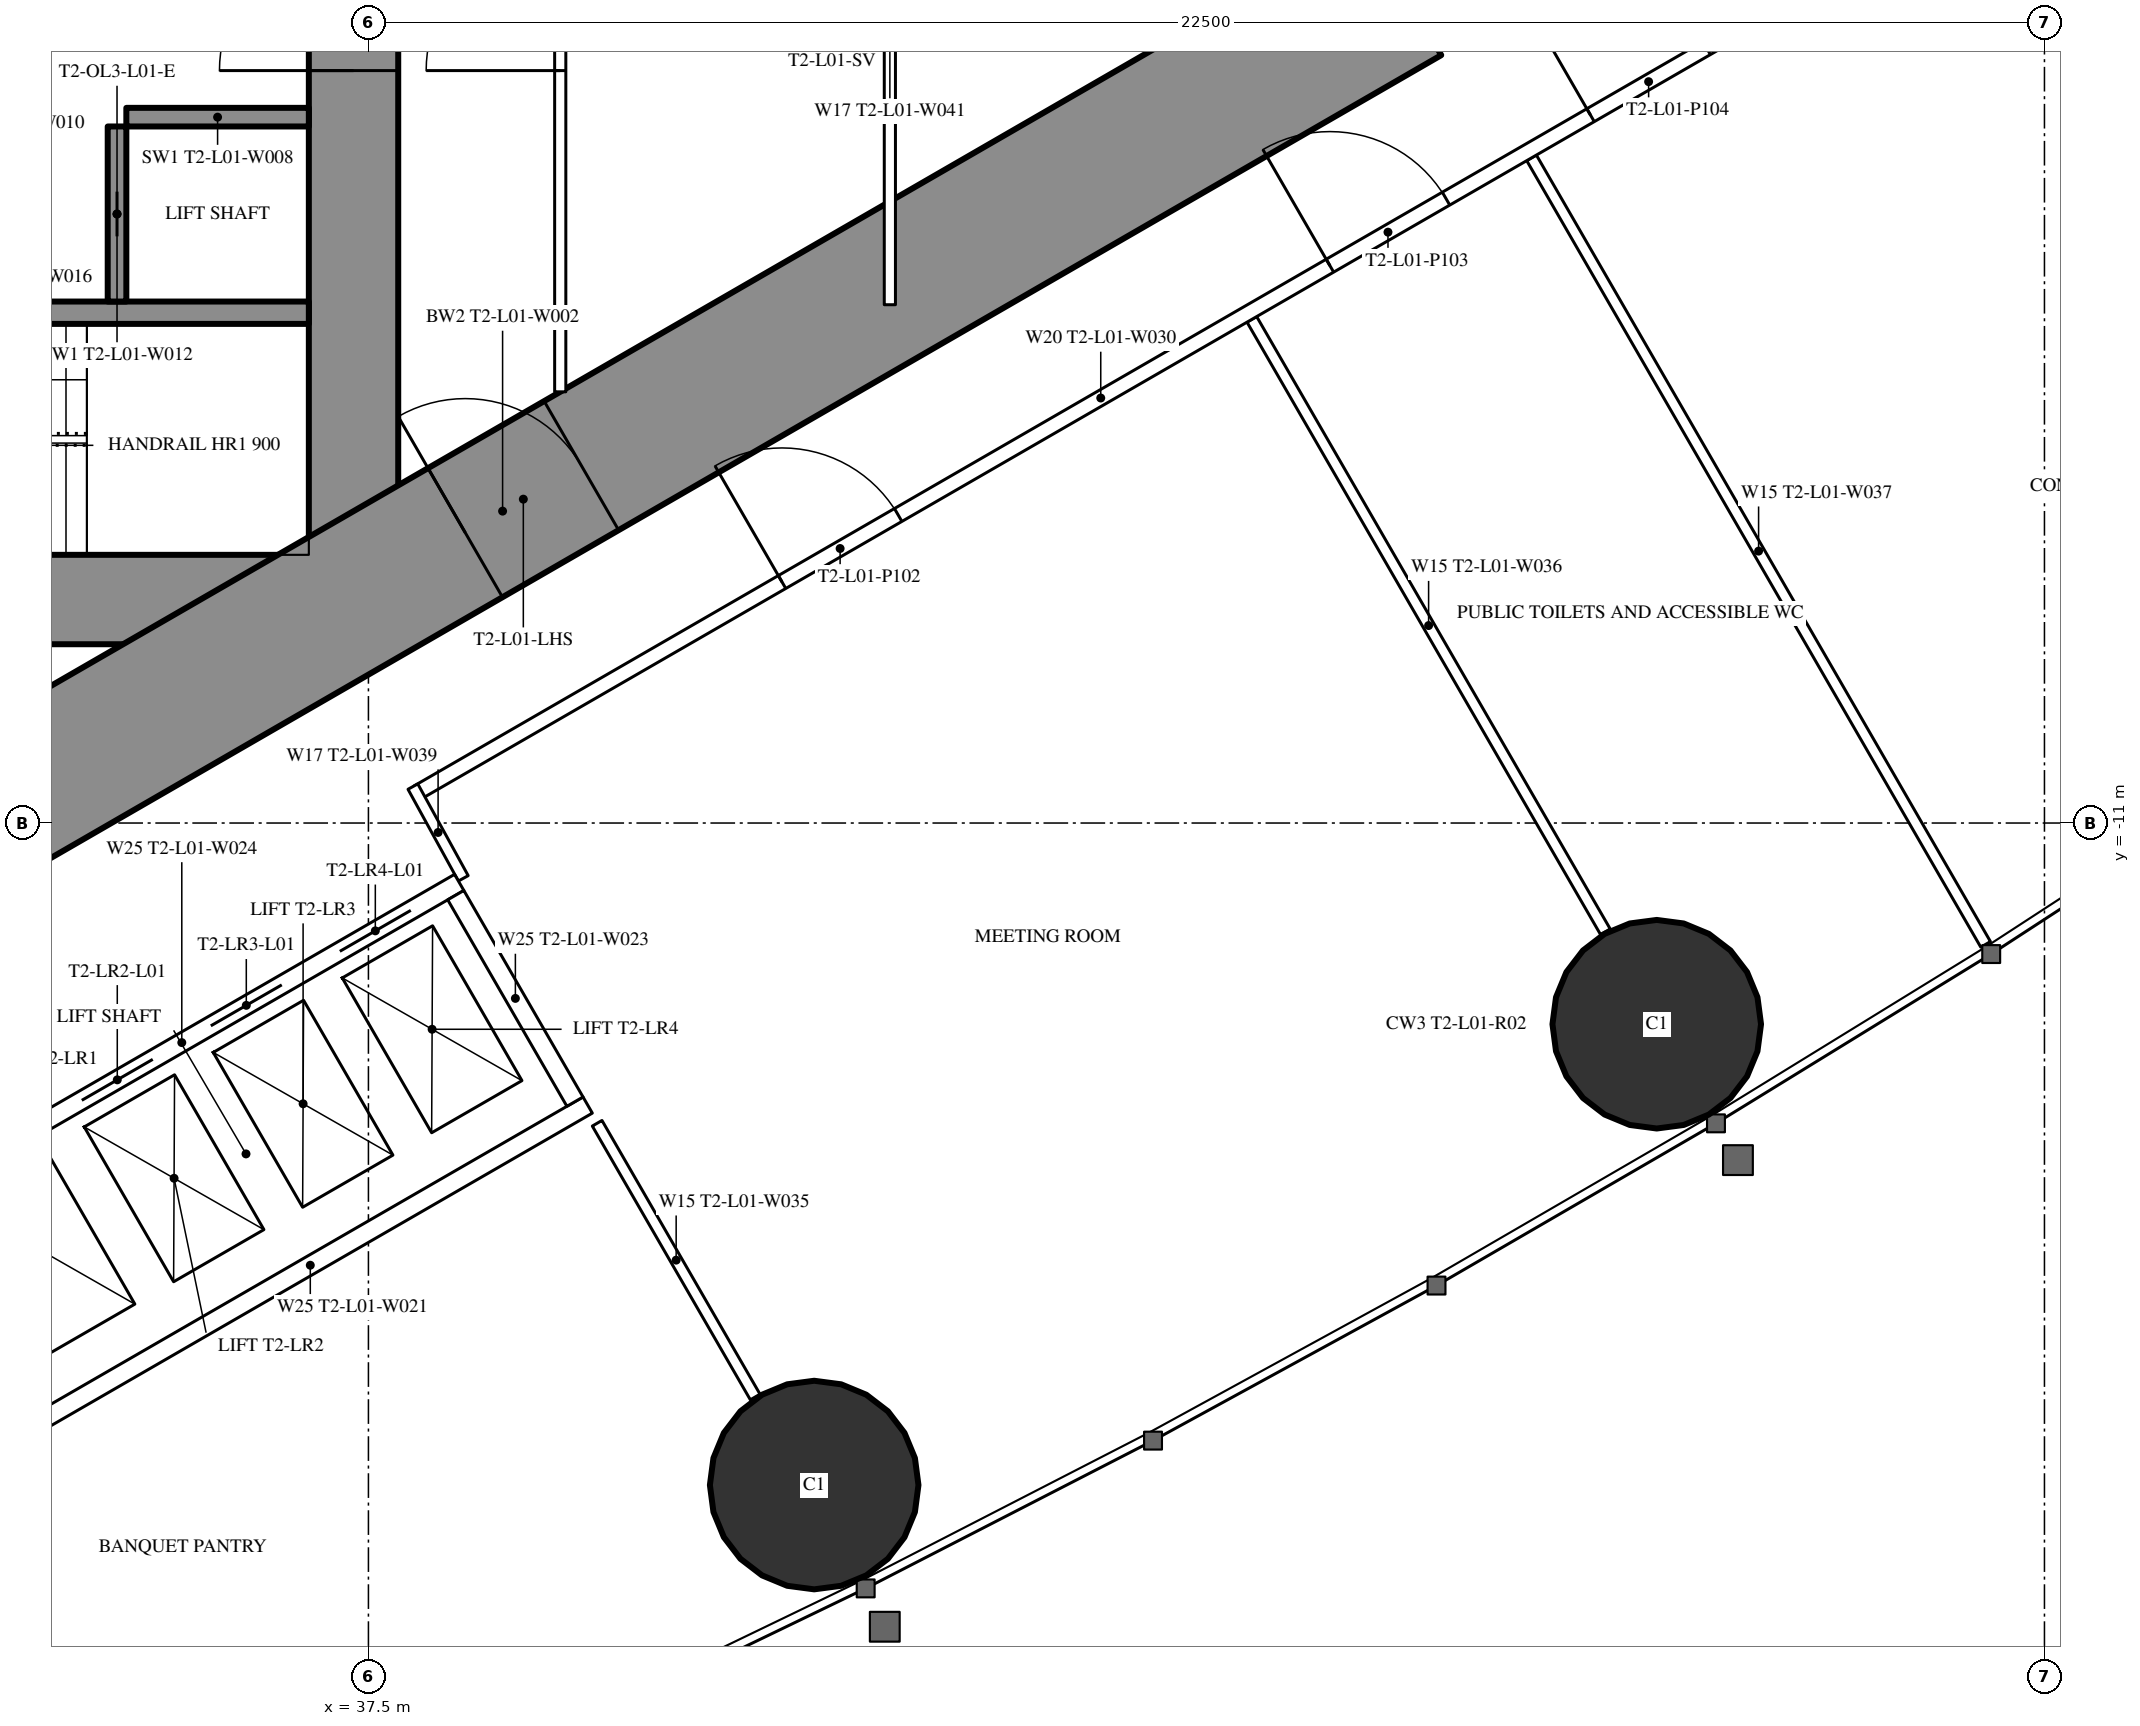
"""IFC4 building model, lengths in metres.
Left out: names, types, materials, properties, quantities, classifications, styles, units other than length and angle.
Written with IfcOpenShell. Run it as: python <this file> out.ifc"""

import sys

from ifc_helpers import new_model, si_unit, direction, frame, frame_2d, origin, origin_2d, place, context, subcontext, project, spatial, rectangle, hollow_circle, extrude, element, fill, save


model = new_model("IFC4")
c1 = context("Model", 3, precision=1e-05, world=origin(), true_north=direction((0.0, 1.0)))
c2 = subcontext(c1, "Body", "Model", "MODEL_VIEW")
j1 = project(units=[si_unit("LENGTHUNIT", "METRE"), si_unit("PLANEANGLEUNIT", "RADIAN")], contexts=[c1])
p1 = place(None, origin())
s1 = spatial("IfcSite", under=j1, at=p1, CompositionType="ELEMENT")
p2 = place(p1, origin())
s2 = spatial("IfcBuilding", under=s1, at=p2, CompositionType="ELEMENT")
p3 = place(p2, frame((0.0, 0.0, 7.2)))
s3 = spatial("IfcBuildingStorey", under=s2, at=p3, CompositionType="ELEMENT", Elevation=7.2)
for number, where, z_axis, x_axis in (
    (1, (43.484, -19.886, 0.0), (0.0, 0.0, 1.0), (1.0, 0.0, 0.0)),
    (2, (54.795, -13.701, 0.0), (0.0, 0.0, 1.0), (1.0, 0.0, 0.0)),
):
    element("IfcColumn", number, at=place(p3, frame(where, z_axis=z_axis, x_axis=x_axis)), inside=s3, PredefinedType="COLUMN", context=c2, shape_type="SweptSolid", body=[
        extrude(hollow_circle(Radius=1.4, WallThickness=0.12, at=origin_2d()), origin(), (0.0, 0.0, 1.0), 5.4),
    ])
p4 = place(p3, frame((61.5, 0.0, 0.0), z_axis=(0.0, 0.0, 1.0), x_axis=(1.0, 0.0, 0.0)))
e3 = element("IfcColumn", 3, at=p4, inside=s3, PredefinedType="COLUMN", context=c2, shape_type="SweptSolid", body=[
    extrude(hollow_circle(Radius=1.4, WallThickness=0.1, at=origin_2d()), origin(), (0.0, 0.0, 1.0), 5.4),
])
p5 = place(p3, frame((37.3, -8.6, 0.0), z_axis=(0.0, 0.0, 1.0), x_axis=(0.0, 1.0, 0.0)))
e4 = element("IfcWall", 4, at=p5, inside=s3, PredefinedType="SHEAR", context=c2, shape_type="SweptSolid", body=[
    extrude(rectangle(XDim=17.2, YDim=1.2, at=frame_2d((8.6, 0.0))), origin(), (0.0, 0.0, 1.0), 5.4),
])
p6 = place(p5, frame((7.7, 0.0, 0.0)))
e5 = element("IfcOpeningElement", 5, at=p6, cuts=e4, PredefinedType="OPENING", context=c2, shape_type="SweptSolid", body=[
    extrude(rectangle(XDim=1.8, YDim=2.2, at=frame_2d((0.9, 1.1))), frame((0.0, 0.61, 0.0), z_axis=(0.0, -1.0, 0.0), x_axis=(1.0, 0.0, 0.0)), (0.0, 0.0, 1.0), 1.22),
])
p7 = place(p3, frame((28.3, -8.0, 0.0), z_axis=(0.0, 0.0, 1.0), x_axis=(1.0, 0.0, 0.0)))
e6 = element("IfcWall", 6, at=p7, inside=s3, PredefinedType="SHEAR", context=c2, shape_type="SweptSolid", body=[
    extrude(rectangle(XDim=8.4, YDim=1.2, at=frame_2d((4.2, 0.0))), origin(), (0.0, 0.0, 1.0), 5.4),
])
p8 = place(p7, frame((0.25, 0.0, 0.0)))
e7 = element("IfcOpeningElement", 7, at=p8, cuts=e6, PredefinedType="OPENING", context=c2, shape_type="SweptSolid", body=[
    extrude(rectangle(XDim=1.0, YDim=2.2, at=frame_2d((0.5, 1.1))), frame((0.0, 0.61, 0.0), z_axis=(0.0, -1.0, 0.0), x_axis=(1.0, 0.0, 0.0)), (0.0, 0.0, 1.0), 1.22),
])
p9 = place(p3, frame((28.3, -4.15, 0.0), z_axis=(0.0, 0.0, 1.0), x_axis=(1.0, 0.0, 0.0)))
e8 = element("IfcWall", 8, at=p9, inside=s3, PredefinedType="SHEAR", context=c2, shape_type="SweptSolid", body=[
    extrude(rectangle(XDim=8.4, YDim=0.3, at=frame_2d((4.2, 0.0))), origin(), (0.0, 0.0, 1.0), 5.4),
])
p10 = place(p3, frame((34.125, -4.0, 0.0), z_axis=(0.0, 0.0, 1.0), x_axis=(0.0, 1.0, 0.0)))
e9 = element("IfcWall", 9, at=p10, inside=s3, PredefinedType="SHEAR", context=c2, shape_type="SweptSolid", body=[
    extrude(rectangle(XDim=2.35, YDim=0.25, at=frame_2d((1.175, 0.0))), origin(), (0.0, 0.0, 1.0), 5.4),
])
p11 = place(p10, frame((0.875, 0.0, 0.0)))
e10 = element("IfcOpeningElement", 10, at=p11, cuts=e9, PredefinedType="OPENING", context=c2, shape_type="SweptSolid", body=[
    extrude(rectangle(XDim=0.6, YDim=2.0, at=frame_2d((0.3, 1.0))), frame((0.0, 0.135, 0.0), z_axis=(0.0, -1.0, 0.0), x_axis=(1.0, 0.0, 0.0)), (0.0, 0.0, 1.0), 0.27),
])
p12 = place(p3, frame((34.25, -1.525, 0.0), z_axis=(0.0, 0.0, 1.0), x_axis=(1.0, 0.0, 0.0)))
e11 = element("IfcWall", 11, at=p12, inside=s3, PredefinedType="SHEAR", context=c2, shape_type="SweptSolid", body=[
    extrude(rectangle(XDim=2.45, YDim=0.25, at=frame_2d((1.225, 0.0))), origin(), (0.0, 0.0, 1.0), 5.4),
])
p13 = place(p3, frame((27.2, -13.8, 0.0), z_axis=(0.0, 0.0, 1.0), x_axis=(0.866027159892, 0.499996958321, 0.0)))
e12 = element("IfcWall", 12, at=p13, inside=s3, PredefinedType="SHEAR", context=c2, shape_type="SweptSolid", body=[
    extrude(rectangle(XDim=27.947, YDim=2.0, at=frame_2d((13.973, 0.0))), origin(), (0.0, 0.0, 1.0), 5.4),
])
p14 = place(p13, frame((4.6, 0.0, 0.0)))
e13 = element("IfcOpeningElement", 13, at=p14, cuts=e12, PredefinedType="OPENING", context=c2, shape_type="SweptSolid", body=[
    extrude(rectangle(XDim=1.0, YDim=2.2, at=frame_2d((0.5, 1.1))), frame((0.0, 1.01, 0.0), z_axis=(0.0, -1.0, 0.0), x_axis=(1.0, 0.0, 0.0)), (0.0, 0.0, 1.0), 2.02),
])
p15 = place(p13, frame((13.395, 0.0, 0.0)))
e14 = element("IfcOpeningElement", 14, at=p15, cuts=e12, PredefinedType="OPENING", context=c2, shape_type="SweptSolid", body=[
    extrude(rectangle(XDim=1.8, YDim=2.2, at=frame_2d((0.9, 1.1))), frame((0.0, 1.01, 0.0), z_axis=(0.0, -1.0, 0.0), x_axis=(1.0, 0.0, 0.0)), (0.0, 0.0, 1.0), 2.02),
])
p16 = place(p3, frame((49.36, -4.239, 0.0), z_axis=(0.0, 0.0, 1.0), x_axis=(0.499984446848, -0.866034383215, 0.0)))
e15 = element("IfcWall", 15, at=p16, inside=s3, PredefinedType="PARTITIONING", context=c2, shape_type="SweptSolid", body=[
    extrude(rectangle(XDim=9.491, YDim=0.15, at=frame_2d((4.746, 0.0))), origin(), (0.0, 0.0, 1.0), 4.05),
])
p17 = place(p3, frame((53.115, -2.071, 0.0), z_axis=(0.0, 0.0, 1.0), x_axis=(0.500000975677, -0.866024840476, 0.0)))
e16 = element("IfcWall", 16, at=p17, inside=s3, PredefinedType="PARTITIONING", context=c2, shape_type="SweptSolid", body=[
    extrude(rectangle(XDim=12.191, YDim=0.15, at=frame_2d((6.095, 0.0))), origin(), (0.0, 0.0, 1.0), 5.05),
])
p18 = place(p3, frame((40.57, -15.03, 0.0), z_axis=(0.0, 0.0, 1.0), x_axis=(0.500012993597, -0.866017901798, 0.0)))
e17 = element("IfcWall", 17, at=p18, inside=s3, PredefinedType="PARTITIONING", context=c2, shape_type="SweptSolid", body=[
    extrude(rectangle(XDim=4.243, YDim=0.15, at=frame_2d((2.122, 0.0))), origin(), (0.0, 0.0, 1.0), 5.05),
])
p19 = place(p3, frame((38.16, -10.59, 0.0), z_axis=(0.0, 0.0, 1.0), x_axis=(0.866027029586, 0.499997184019, 0.0)))
e18 = element("IfcWall", 18, at=p19, inside=s3, PredefinedType="PARTITIONING", context=c2, shape_type="SweptSolid", body=[
    extrude(rectangle(XDim=21.18, YDim=0.2, at=frame_2d((10.59, 0.0))), origin(), (0.0, 0.0, 1.0), 5.05),
])
p20 = place(p19, frame((14.142, 0.0, 0.0)))
e19 = element("IfcOpeningElement", 19, at=p20, cuts=e18, PredefinedType="OPENING", context=c2, shape_type="SweptSolid", body=[
    extrude(rectangle(XDim=1.8, YDim=2.2, at=frame_2d((0.9, 1.1))), frame((0.0, 0.11, 0.0), z_axis=(0.0, -1.0, 0.0), x_axis=(1.0, 0.0, 0.0)), (0.0, 0.0, 1.0), 0.22),
])
p21 = place(p19, frame((18.183, 0.0, 0.0)))
e20 = element("IfcOpeningElement", 20, at=p21, cuts=e18, PredefinedType="OPENING", context=c2, shape_type="SweptSolid", body=[
    extrude(rectangle(XDim=1.8, YDim=2.2, at=frame_2d((0.9, 1.1))), frame((0.0, 0.11, 0.0), z_axis=(0.0, -1.0, 0.0), x_axis=(1.0, 0.0, 0.0)), (0.0, 0.0, 1.0), 0.22),
])
p22 = place(p19, frame((5.65, 0.0, 0.0)))
e21 = element("IfcOpeningElement", 21, at=p22, cuts=e18, PredefinedType="OPENING", context=c2, shape_type="SweptSolid", body=[
    extrude(rectangle(XDim=1.8, YDim=2.2, at=frame_2d((0.9, 1.1))), frame((0.0, 0.11, 0.0), z_axis=(0.0, -1.0, 0.0), x_axis=(1.0, 0.0, 0.0)), (0.0, 0.0, 1.0), 0.22),
])
p23 = place(p3, frame((38.773, -11.742, 0.0), z_axis=(0.0, 0.0, 1.0), x_axis=(-0.481418475768, 0.876490873421, 0.0)))
e22 = element("IfcWall", 22, at=p23, inside=s3, PredefinedType="PARTITIONING", context=c2, shape_type="SweptSolid", body=[
    extrude(rectangle(XDim=1.405, YDim=0.15, at=frame_2d((0.703, 0.0))), origin(), (0.0, 0.0, 1.0), 5.05),
])
p24 = place(p3, frame((40.075, -5.212, 0.0), z_axis=(0.0, 0.0, 1.0), x_axis=(0.0, 1.0, 0.0)))
e23 = element("IfcWall", 23, at=p24, inside=s3, PredefinedType="PARTITIONING", context=c2, shape_type="SweptSolid", body=[
    extrude(rectangle(XDim=10.424, YDim=0.15, at=frame_2d((5.212, 0.0))), origin(), (0.0, 0.0, 1.0), 5.05),
])
p25 = place(p24, frame((4.312, 0.0, 0.0)))
e24 = element("IfcOpeningElement", 24, at=p25, cuts=e23, PredefinedType="OPENING", context=c2, shape_type="SweptSolid", body=[
    extrude(rectangle(XDim=1.8, YDim=2.2, at=frame_2d((0.9, 1.1))), frame((0.0, 0.085, 0.0), z_axis=(0.0, -1.0, 0.0), x_axis=(1.0, 0.0, 0.0)), (0.0, 0.0, 1.0), 0.17),
])
p26 = place(p3, frame((44.5, -4.043, 0.0), z_axis=(0.0, 0.0, 1.0), x_axis=(0.0, 1.0, 0.0)))
e25 = element("IfcWall", 25, at=p26, inside=s3, PredefinedType="PARTITIONING", context=c2, shape_type="SweptSolid", body=[
    extrude(rectangle(XDim=8.085, YDim=0.15, at=frame_2d((4.043, 0.0))), origin(), (0.0, 0.0, 1.0), 3.65),
])
p27 = place(p26, frame((3.543, 0.0, 0.0)))
e26 = element("IfcOpeningElement", 26, at=p27, cuts=e25, PredefinedType="OPENING", context=c2, shape_type="SweptSolid", body=[
    extrude(rectangle(XDim=1.0, YDim=2.2, at=frame_2d((0.5, 1.1))), frame((0.0, 0.085, 0.0), z_axis=(0.0, -1.0, 0.0), x_axis=(1.0, 0.0, 0.0)), (0.0, 0.0, 1.0), 0.17),
])
p28 = place(p3, frame((31.271, -16.097, 0.0), z_axis=(0.0, 0.0, 1.0), x_axis=(0.86604045752, 0.499973925258, 0.0)))
e27 = element("IfcWall", 27, at=p28, inside=s3, PredefinedType="PARTITIONING", context=c2, shape_type="SweptSolid", body=[
    extrude(rectangle(XDim=8.6, YDim=0.25, at=frame_2d((4.3, 0.0))), origin(), (0.0, 0.0, 1.0), 5.05),
])
p29 = place(p28, frame((0.75, 0.0, 0.0)))
e28 = element("IfcOpeningElement", 28, at=p29, cuts=e27, PredefinedType="OPENING", context=c2, shape_type="SweptSolid", body=[
    extrude(rectangle(XDim=1.1, YDim=2.2, at=frame_2d((0.55, 1.1))), frame((0.0, 0.135, 0.0), z_axis=(0.0, -1.0, 0.0), x_axis=(1.0, 0.0, 0.0)), (0.0, 0.0, 1.0), 0.27),
])
p30 = place(p28, frame((2.75, 0.0, 0.0)))
e29 = element("IfcOpeningElement", 29, at=p30, cuts=e27, PredefinedType="OPENING", context=c2, shape_type="SweptSolid", body=[
    extrude(rectangle(XDim=1.1, YDim=2.2, at=frame_2d((0.55, 1.1))), frame((0.0, 0.135, 0.0), z_axis=(0.0, -1.0, 0.0), x_axis=(1.0, 0.0, 0.0)), (0.0, 0.0, 1.0), 0.27),
])
p31 = place(p28, frame((4.75, 0.0, 0.0)))
e30 = element("IfcOpeningElement", 30, at=p31, cuts=e27, PredefinedType="OPENING", context=c2, shape_type="SweptSolid", body=[
    extrude(rectangle(XDim=1.1, YDim=2.2, at=frame_2d((0.55, 1.1))), frame((0.0, 0.135, 0.0), z_axis=(0.0, -1.0, 0.0), x_axis=(1.0, 0.0, 0.0)), (0.0, 0.0, 1.0), 0.27),
])
p32 = place(p28, frame((6.75, 0.0, 0.0)))
e31 = element("IfcOpeningElement", 31, at=p32, cuts=e27, PredefinedType="OPENING", context=c2, shape_type="SweptSolid", body=[
    extrude(rectangle(XDim=1.1, YDim=2.2, at=frame_2d((0.55, 1.1))), frame((0.0, 0.135, 0.0), z_axis=(0.0, -1.0, 0.0), x_axis=(1.0, 0.0, 0.0)), (0.0, 0.0, 1.0), 0.27),
])
p33 = place(p3, frame((32.996, -19.086, 0.0), z_axis=(0.0, 0.0, 1.0), x_axis=(0.866028165386, 0.499995216735, 0.0)))
e32 = element("IfcWall", 32, at=p33, inside=s3, PredefinedType="PARTITIONING", context=c2, shape_type="SweptSolid", body=[
    extrude(rectangle(XDim=8.6, YDim=0.25, at=frame_2d((4.3, 0.0))), origin(), (0.0, 0.0, 1.0), 5.05),
])
p34 = place(p3, frame((38.673, -11.968, 0.0), z_axis=(0.0, 0.0, 1.0), x_axis=(0.499929347863, -0.866066190972, 0.0)))
e33 = element("IfcWall", 33, at=p34, inside=s3, PredefinedType="PARTITIONING", context=c2, shape_type="SweptSolid", body=[
    extrude(rectangle(XDim=3.201, YDim=0.25, at=frame_2d((1.6, 0.0))), origin(), (0.0, 0.0, 1.0), 5.05),
])
p35 = place(p20, origin())
e34 = element("IfcDoor", 34, at=p35, inside=s3, OperationType="DOUBLE_DOOR_SINGLE_SWING", PredefinedType="DOOR", context=c2, shape_type="SweptSolid", body=[
    extrude(rectangle(XDim=1.8, YDim=2.2, at=frame_2d((0.9, 1.1))), frame((0.0, 0.025, 0.0), z_axis=(0.0, -1.0, 0.0), x_axis=(1.0, 0.0, 0.0)), (0.0, 0.0, 1.0), 0.05),
])
fill(e19, e34)
p36 = place(p21, origin())
e35 = element("IfcDoor", 35, at=p36, inside=s3, OperationType="DOUBLE_DOOR_SINGLE_SWING", PredefinedType="DOOR", context=c2, shape_type="SweptSolid", body=[
    extrude(rectangle(XDim=1.8, YDim=2.2, at=frame_2d((0.9, 1.1))), frame((0.0, 0.025, 0.0), z_axis=(0.0, -1.0, 0.0), x_axis=(1.0, 0.0, 0.0)), (0.0, 0.0, 1.0), 0.05),
])
fill(e20, e35)
p37 = place(p22, origin())
e36 = element("IfcDoor", 36, at=p37, inside=s3, OperationType="DOUBLE_DOOR_SINGLE_SWING", PredefinedType="DOOR", context=c2, shape_type="SweptSolid", body=[
    extrude(rectangle(XDim=1.8, YDim=2.2, at=frame_2d((0.9, 1.1))), frame((0.0, 0.025, 0.0), z_axis=(0.0, -1.0, 0.0), x_axis=(1.0, 0.0, 0.0)), (0.0, 0.0, 1.0), 0.05),
])
fill(e21, e36)
p38 = place(p25, origin())
e37 = element("IfcDoor", 37, at=p38, inside=s3, OperationType="DOUBLE_DOOR_SINGLE_SWING", PredefinedType="DOOR", context=c2, shape_type="SweptSolid", body=[
    extrude(rectangle(XDim=1.8, YDim=2.2, at=frame_2d((0.9, 1.1))), frame((0.0, 0.025, 0.0), z_axis=(0.0, -1.0, 0.0), x_axis=(1.0, 0.0, 0.0)), (0.0, 0.0, 1.0), 0.05),
])
fill(e24, e37)
p39 = place(p15, origin())
e38 = element("IfcDoor", 38, at=p39, inside=s3, OperationType="DOUBLE_DOOR_SINGLE_SWING", PredefinedType="DOOR", context=c2, shape_type="SweptSolid", body=[
    extrude(rectangle(XDim=1.8, YDim=2.2, at=frame_2d((0.9, 1.1))), frame((0.0, 0.025, 0.0), z_axis=(0.0, -1.0, 0.0), x_axis=(1.0, 0.0, 0.0)), (0.0, 0.0, 1.0), 0.05),
])
fill(e14, e38)
p40 = place(p6, origin())
e39 = element("IfcDoor", 39, at=p40, inside=s3, OperationType="DOUBLE_DOOR_SINGLE_SWING", PredefinedType="DOOR", context=c2, shape_type="SweptSolid", body=[
    extrude(rectangle(XDim=1.8, YDim=2.2, at=frame_2d((0.9, 1.1))), frame((0.0, 0.025, 0.0), z_axis=(0.0, -1.0, 0.0), x_axis=(1.0, 0.0, 0.0)), (0.0, 0.0, 1.0), 0.05),
])
fill(e5, e39)
p41 = place(p11, origin())
e40 = element("IfcDoor", 40, at=p41, inside=s3, OperationType="SLIDING_TO_LEFT", PredefinedType="DOOR", context=c2, shape_type="SweptSolid", body=[
    extrude(rectangle(XDim=0.6, YDim=2.0, at=frame_2d((0.3, 1.0))), frame((0.0, 0.025, 0.0), z_axis=(0.0, -1.0, 0.0), x_axis=(1.0, 0.0, 0.0)), (0.0, 0.0, 1.0), 0.05),
])
fill(e10, e40)
p42 = place(p30, origin())
e41 = element("IfcDoor", 41, at=p42, inside=s3, OperationType="DOUBLE_DOOR_SLIDING", PredefinedType="USERDEFINED", context=c2, shape_type="SweptSolid", body=[
    extrude(rectangle(XDim=1.1, YDim=2.2, at=frame_2d((0.55, 1.1))), frame((0.0, 0.025, 0.0), z_axis=(0.0, -1.0, 0.0), x_axis=(1.0, 0.0, 0.0)), (0.0, 0.0, 1.0), 0.05),
])
fill(e29, e41)
p43 = place(p31, origin())
e42 = element("IfcDoor", 42, at=p43, inside=s3, OperationType="DOUBLE_DOOR_SLIDING", PredefinedType="USERDEFINED", context=c2, shape_type="SweptSolid", body=[
    extrude(rectangle(XDim=1.1, YDim=2.2, at=frame_2d((0.55, 1.1))), frame((0.0, 0.025, 0.0), z_axis=(0.0, -1.0, 0.0), x_axis=(1.0, 0.0, 0.0)), (0.0, 0.0, 1.0), 0.05),
])
fill(e30, e42)
p44 = place(p32, origin())
e43 = element("IfcDoor", 43, at=p44, inside=s3, OperationType="DOUBLE_DOOR_SLIDING", PredefinedType="USERDEFINED", context=c2, shape_type="SweptSolid", body=[
    extrude(rectangle(XDim=1.1, YDim=2.2, at=frame_2d((0.55, 1.1))), frame((0.0, 0.025, 0.0), z_axis=(0.0, -1.0, 0.0), x_axis=(1.0, 0.0, 0.0)), (0.0, 0.0, 1.0), 0.05),
])
fill(e31, e43)
save(model, sys.argv[1])
